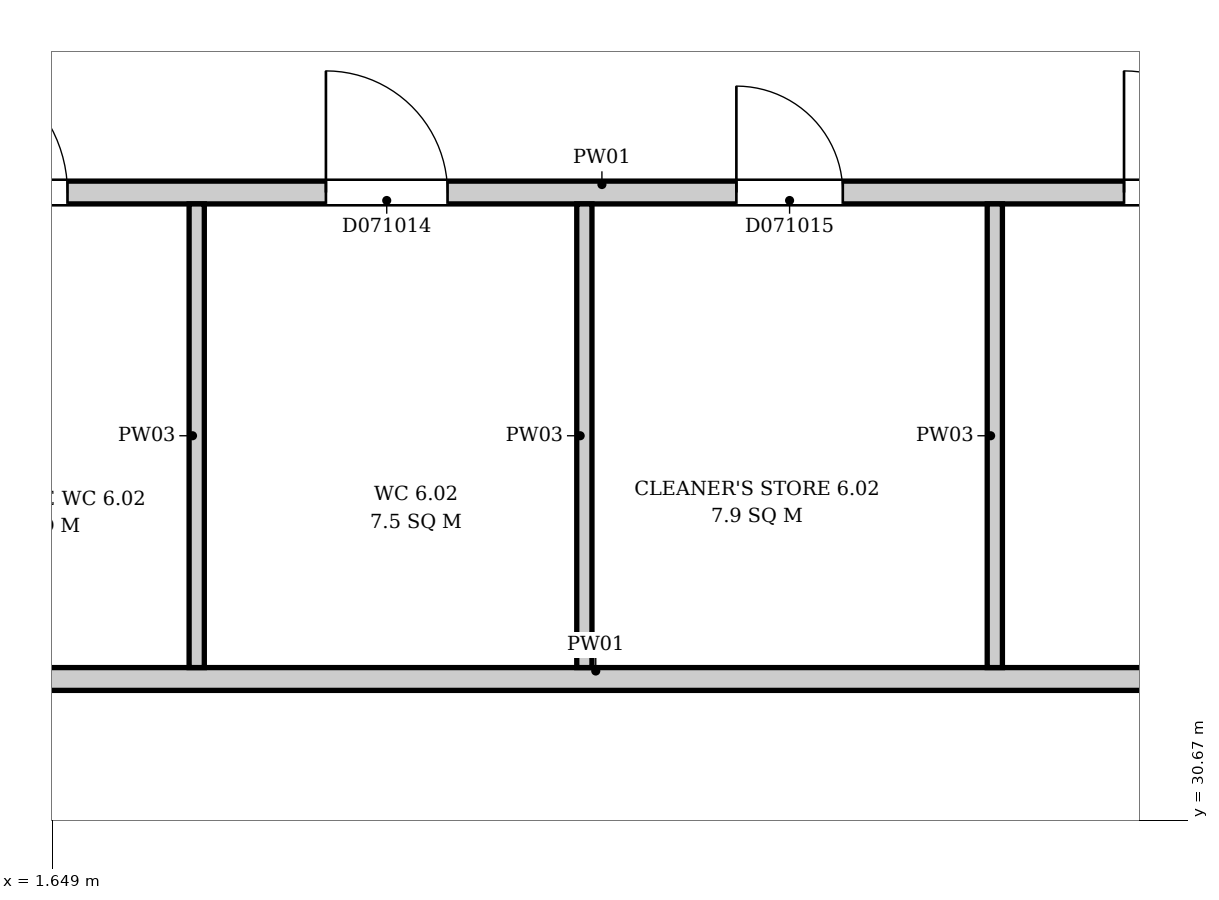
"""IFC4 building model, lengths in metres.
Left out: names, types, materials, properties, quantities, classifications, styles, units other than length and angle.
Written with IfcOpenShell. Run it as: python <this file> out.ifc"""

import sys

from ifc_helpers import new_model, si_unit, direction, frame, frame_2d, origin, place, context, subcontext, project, spatial, rectangle, extrude, element, fill, save


model = new_model("IFC4")
c1 = context("Model", 3, precision=1e-05, world=origin(), true_north=direction((0.0, 1.0)))
c2 = subcontext(c1, "Body", "Model", "MODEL_VIEW")
j1 = project(units=[si_unit("LENGTHUNIT", "METRE"), si_unit("PLANEANGLEUNIT", "RADIAN")], contexts=[c1])
p1 = place(None, origin())
s1 = spatial("IfcSite", under=j1, at=p1, CompositionType="ELEMENT")
p2 = place(p1, origin())
s2 = spatial("IfcBuilding", under=s1, at=p2, CompositionType="ELEMENT")
p3 = place(p2, frame((0.0, 0.0, 36.1)))
s3 = spatial("IfcBuildingStorey", under=s2, at=p3, CompositionType="ELEMENT", Elevation=36.1)
p4 = place(p3, frame((0.056, 31.6, 0.0), z_axis=(0.0, 0.0, 1.0), x_axis=(1.0, 0.0, 0.0)))
e1 = element("IfcWall", 1, at=p4, inside=s3, PredefinedType="PARTITIONING", context=c2, shape_type="SweptSolid", body=[
    extrude(rectangle(XDim=10.338, YDim=0.15, at=frame_2d((5.169, 0.0))), origin(), (0.0, 0.0, 1.0), 3.9),
])
p5 = place(p3, frame((0.056, 34.8, 0.0), z_axis=(0.0, 0.0, 1.0), x_axis=(1.0, 0.0, 0.0)))
e2 = element("IfcWall", 2, at=p5, inside=s3, PredefinedType="PARTITIONING", context=c2, shape_type="SweptSolid", body=[
    extrude(rectangle(XDim=10.419, YDim=0.15, at=frame_2d((5.209, 0.0))), origin(), (0.0, 0.0, 1.0), 3.9),
])
p6 = place(p5, frame((0.794, 0.0, 0.0)))
e3 = element("IfcOpeningElement", 3, at=p6, cuts=e2, PredefinedType="OPENING", context=c2, shape_type="SweptSolid", body=[
    extrude(rectangle(XDim=0.9, YDim=2.1, at=frame_2d((0.45, 1.05))), frame((0.0, 0.085, 0.0), z_axis=(0.0, -1.0, 0.0), x_axis=(1.0, 0.0, 0.0)), (0.0, 0.0, 1.0), 0.17),
])
p7 = place(p5, frame((3.394, 0.0, 0.0)))
e4 = element("IfcOpeningElement", 4, at=p7, cuts=e2, PredefinedType="OPENING", context=c2, shape_type="SweptSolid", body=[
    extrude(rectangle(XDim=0.8, YDim=2.1, at=frame_2d((0.4, 1.05))), frame((0.0, 0.085, 0.0), z_axis=(0.0, -1.0, 0.0), x_axis=(1.0, 0.0, 0.0)), (0.0, 0.0, 1.0), 0.17),
])
p8 = place(p5, frame((6.094, 0.0, 0.0)))
e5 = element("IfcOpeningElement", 5, at=p8, cuts=e2, PredefinedType="OPENING", context=c2, shape_type="SweptSolid", body=[
    extrude(rectangle(XDim=0.7, YDim=2.1, at=frame_2d((0.35, 1.05))), frame((0.0, 0.085, 0.0), z_axis=(0.0, -1.0, 0.0), x_axis=(1.0, 0.0, 0.0)), (0.0, 0.0, 1.0), 0.17),
])
p9 = place(p5, frame((8.644, 0.0, 0.0)))
e6 = element("IfcOpeningElement", 6, at=p9, cuts=e2, PredefinedType="OPENING", context=c2, shape_type="SweptSolid", body=[
    extrude(rectangle(XDim=0.8, YDim=2.1, at=frame_2d((0.4, 1.05))), frame((0.0, 0.085, 0.0), z_axis=(0.0, -1.0, 0.0), x_axis=(1.0, 0.0, 0.0)), (0.0, 0.0, 1.0), 0.17),
])
for number, where, z_axis, x_axis in (
    (7, (2.6, 31.675, 0.0), (0.0, 0.0, 1.0), (0.0, 1.0, 0.0)),
    (8, (5.15, 31.675, 0.0), (0.0, 0.0, 1.0), (0.0, 1.0, 0.0)),
    (9, (7.85, 31.675, 0.0), (0.0, 0.0, 1.0), (0.0, 1.0, 0.0)),
):
    element("IfcWall", number, at=place(p3, frame(where, z_axis=z_axis, x_axis=x_axis)), inside=s3, PredefinedType="PARTITIONING", context=c2, shape_type="SweptSolid", body=[
        extrude(rectangle(XDim=3.05, YDim=0.1, at=frame_2d((1.525, 0.0))), origin(), (0.0, 0.0, 1.0), 3.9),
    ])
p10 = place(p6, origin())
e10 = element("IfcDoor", 10, at=p10, inside=s3, OperationType="SINGLE_SWING_LEFT", PredefinedType="DOOR", context=c2, shape_type="SweptSolid", body=[
    extrude(rectangle(XDim=0.9, YDim=2.1, at=frame_2d((0.45, 1.05))), frame((0.0, 0.025, 0.0), z_axis=(0.0, -1.0, 0.0), x_axis=(1.0, 0.0, 0.0)), (0.0, 0.0, 1.0), 0.05),
])
fill(e3, e10)
p11 = place(p7, origin())
e11 = element("IfcDoor", 11, at=p11, inside=s3, OperationType="SINGLE_SWING_LEFT", PredefinedType="DOOR", context=c2, shape_type="SweptSolid", body=[
    extrude(rectangle(XDim=0.8, YDim=2.1, at=frame_2d((0.4, 1.05))), frame((0.0, 0.025, 0.0), z_axis=(0.0, -1.0, 0.0), x_axis=(1.0, 0.0, 0.0)), (0.0, 0.0, 1.0), 0.05),
])
fill(e4, e11)
p12 = place(p8, origin())
e12 = element("IfcDoor", 12, at=p12, inside=s3, OperationType="SINGLE_SWING_LEFT", PredefinedType="DOOR", context=c2, shape_type="SweptSolid", body=[
    extrude(rectangle(XDim=0.7, YDim=2.1, at=frame_2d((0.35, 1.05))), frame((0.0, 0.025, 0.0), z_axis=(0.0, -1.0, 0.0), x_axis=(1.0, 0.0, 0.0)), (0.0, 0.0, 1.0), 0.05),
])
fill(e5, e12)
p13 = place(p9, origin())
e13 = element("IfcDoor", 13, at=p13, inside=s3, OperationType="SINGLE_SWING_LEFT", PredefinedType="DOOR", context=c2, shape_type="SweptSolid", body=[
    extrude(rectangle(XDim=0.8, YDim=2.1, at=frame_2d((0.4, 1.05))), frame((0.0, 0.025, 0.0), z_axis=(0.0, -1.0, 0.0), x_axis=(1.0, 0.0, 0.0)), (0.0, 0.0, 1.0), 0.05),
])
fill(e6, e13)
save(model, sys.argv[1])
